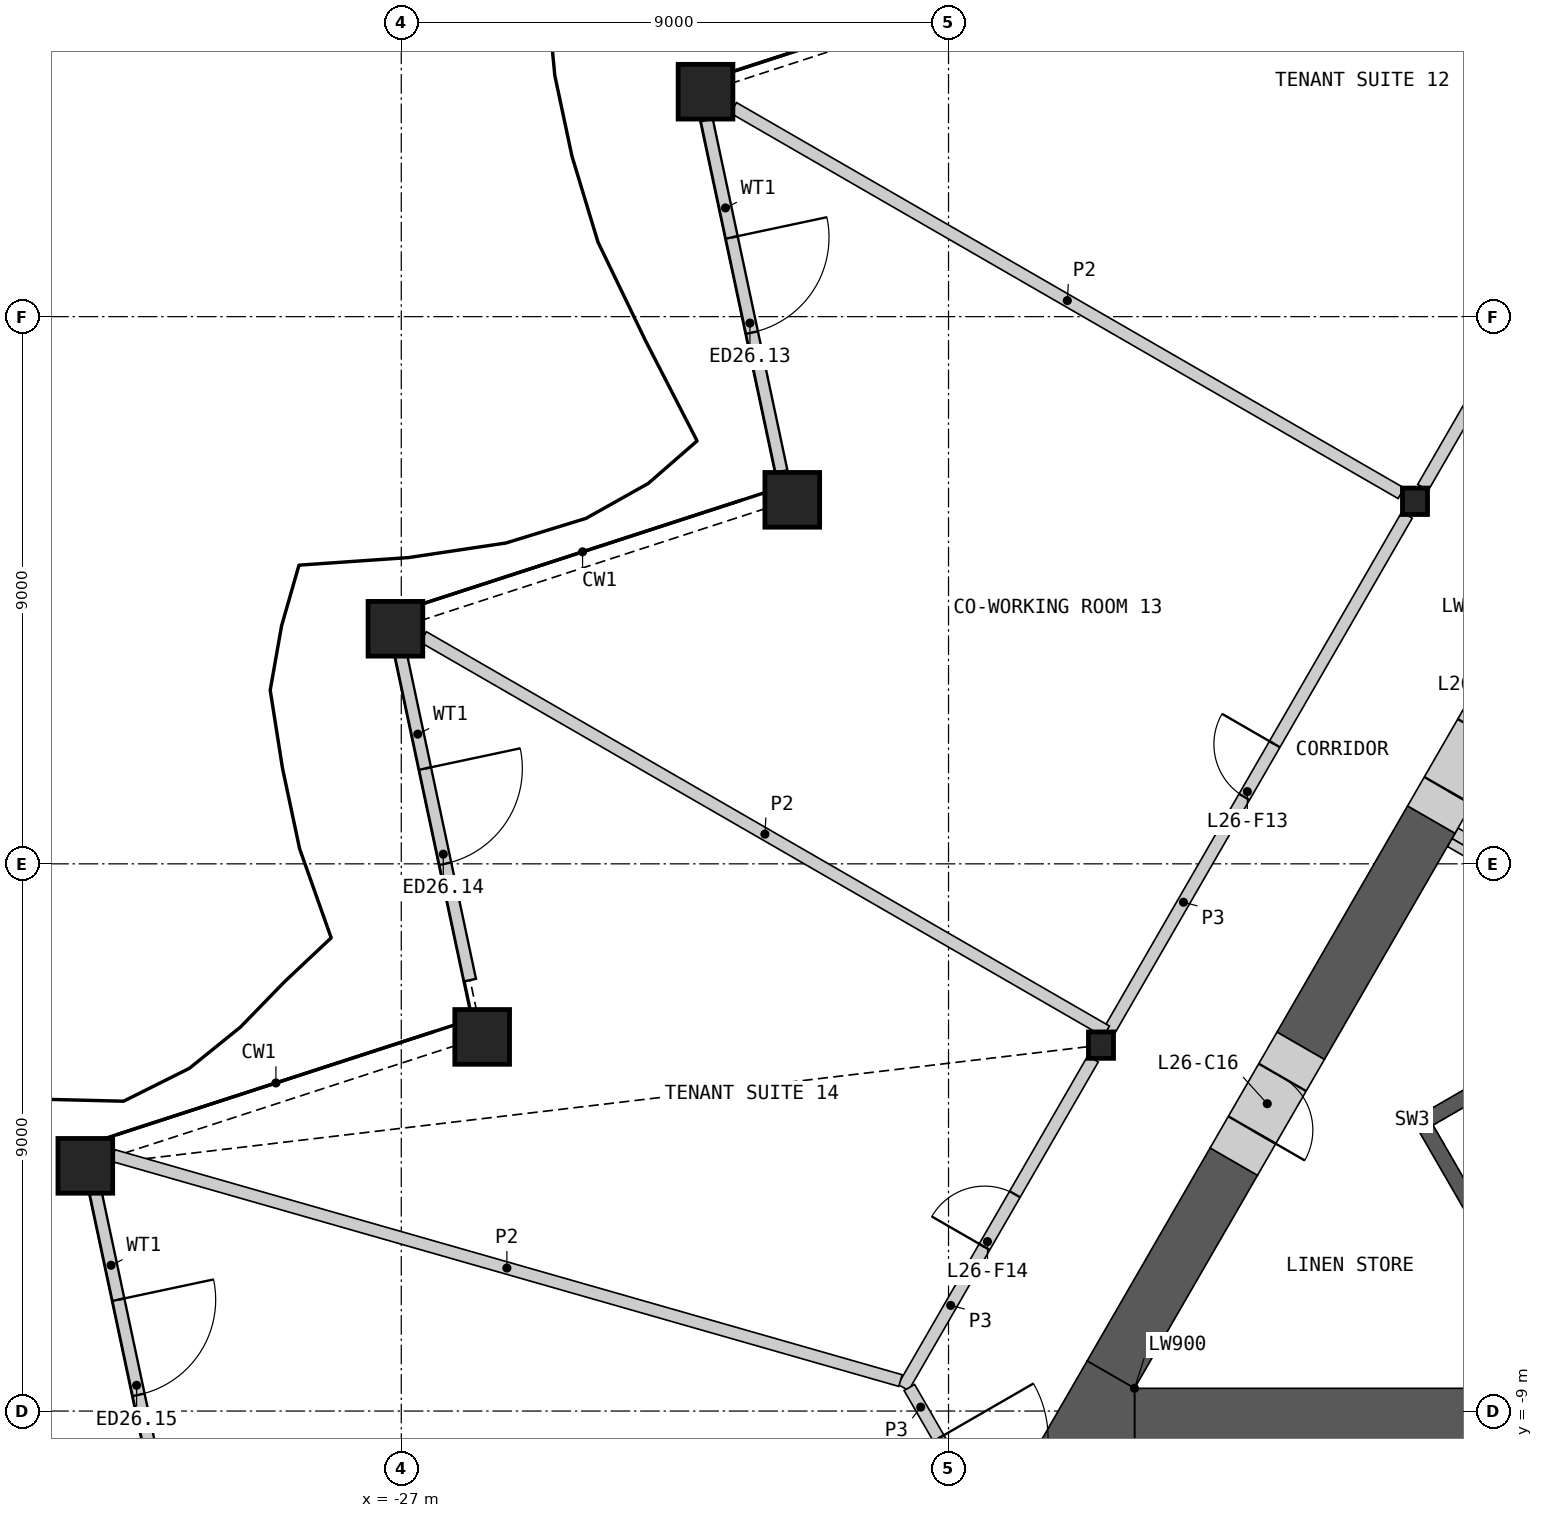
"""IFC4 building model, lengths in metres.
Left out: names, types, materials, properties, quantities, classifications, styles, units other than length and angle.
Written with IfcOpenShell. Run it as: python <this file> out.ifc"""

import sys

from ifc_helpers import new_model, si_unit, direction, frame, frame_2d, origin, origin_2d, place, context, subcontext, project, spatial, polyline, rectangle, hollow_rectangle, i_section, outline, extrude, element, fill, save


model = new_model("IFC4")
c1 = context("Model", 3, precision=1e-05, world=origin(), true_north=direction((0.0, 1.0)))
c2 = subcontext(c1, "Body", "Model", "MODEL_VIEW")
j1 = project(units=[si_unit("LENGTHUNIT", "METRE"), si_unit("PLANEANGLEUNIT", "RADIAN")], contexts=[c1])
p1 = place(None, origin())
s1 = spatial("IfcSite", under=j1, at=p1, CompositionType="ELEMENT")
p2 = place(p1, origin())
s2 = spatial("IfcBuilding", under=s1, at=p2, CompositionType="ELEMENT")
p3 = place(p2, frame((0.0, 0.0, 124.8)))
s3 = spatial("IfcBuildingStorey", under=s2, at=p3, CompositionType="ELEMENT", Elevation=124.8)
for number, where, z_axis, x_axis in (
    (1, (-21.996, 12.699, 0.0), (0.0, 0.0, 1.0), (1.0, 0.0, 0.0)),
    (2, (-20.57, 5.987, 0.0), (0.0, 0.0, 1.0), (1.0, 0.0, 0.0)),
    (3, (-27.096, 3.866, 0.0), (0.0, 0.0, 1.0), (1.0, 0.0, 0.0)),
    (4, (-25.669, -2.846, 0.0), (0.0, 0.0, 1.0), (1.0, 0.0, 0.0)),
    (5, (-32.196, -4.967, 0.0), (0.0, 0.0, 1.0), (1.0, 0.0, 0.0)),
):
    element("IfcColumn", number, at=place(p3, frame(where, z_axis=z_axis, x_axis=x_axis)), inside=s3, PredefinedType="COLUMN", context=c2, shape_type="SweptSolid", body=[
        extrude(hollow_rectangle(XDim=0.9, YDim=0.9, WallThickness=0.06, at=origin_2d()), origin(), (0.0, 0.0, 1.0), 4.2),
    ])
for number, where, z_axis, x_axis in (
    (6, (-10.328, 5.963, 0.0), (0.0, 0.0, 1.0), (1.0, 0.0, 0.0)),
    (7, (-15.493, -2.982, 0.0), (0.0, 0.0, 1.0), (1.0, 0.0, 0.0)),
):
    element("IfcColumn", number, at=place(p3, frame(where, z_axis=z_axis, x_axis=x_axis)), inside=s3, PredefinedType="COLUMN", context=c2, shape_type="SweptSolid", body=[
        extrude(i_section(OverallWidth=0.412, OverallDepth=0.435, WebThickness=0.036, FlangeThickness=0.057, at=origin_2d()), origin(), (0.0, 0.0, 1.0), 4.2),
    ])
p4 = place(p3, frame((-21.976, 12.233, 0.0), z_axis=(0.0, 0.0, 1.0), x_axis=(0.207925965623, -0.978144566421, 0.0)))
e8 = element("IfcWall", 8, at=p4, inside=s3, PredefinedType="SOLIDWALL", context=c2, shape_type="SweptSolid", body=[
    extrude(rectangle(XDim=5.908, YDim=0.2, at=frame_2d((2.954, 0.0))), origin(), (0.0, 0.0, 1.0), 3.189),
])
p5 = place(p4, frame((1.973, 0.0, 0.0)))
e9 = element("IfcOpeningElement", 9, at=p5, cuts=e8, PredefinedType="OPENING", context=c2, shape_type="SweptSolid", body=[
    extrude(rectangle(XDim=1.6, YDim=2.4, at=frame_2d((0.8, 1.2))), frame((0.0, 0.11, 0.0), z_axis=(0.0, -1.0, 0.0), x_axis=(1.0, 0.0, 0.0)), (0.0, 0.0, 1.0), 0.22),
])
p6 = place(p3, frame((-27.016, 3.482, 0.0), z_axis=(0.0, 0.0, 1.0), x_axis=(0.207902173992, -0.978149623549, 0.0)))
e10 = element("IfcWall", 10, at=p6, inside=s3, PredefinedType="SOLIDWALL", context=c2, shape_type="SweptSolid", body=[
    extrude(rectangle(XDim=5.515, YDim=0.2, at=frame_2d((2.757, 0.0))), origin(), (0.0, 0.0, 1.0), 3.189),
])
p7 = place(p6, frame((1.957, 0.0, 0.0)))
e11 = element("IfcOpeningElement", 11, at=p7, cuts=e10, PredefinedType="OPENING", context=c2, shape_type="SweptSolid", body=[
    extrude(rectangle(XDim=1.6, YDim=2.4, at=frame_2d((0.8, 1.2))), frame((0.0, 0.11, 0.0), z_axis=(0.0, -1.0, 0.0), x_axis=(1.0, 0.0, 0.0)), (0.0, 0.0, 1.0), 0.22),
])
p8 = place(p3, frame((-32.059, -5.254, 0.0), z_axis=(0.0, 0.0, 1.0), x_axis=(0.207902173992, -0.978149623549, 0.0)))
e12 = element("IfcWall", 12, at=p8, inside=s3, PredefinedType="SOLIDWALL", context=c2, shape_type="SweptSolid", body=[
    extrude(rectangle(XDim=5.515, YDim=0.2, at=frame_2d((2.757, 0.0))), origin(), (0.0, 0.0, 1.0), 3.189),
])
p9 = place(p8, frame((1.957, 0.0, 0.0)))
e13 = element("IfcOpeningElement", 13, at=p9, cuts=e12, PredefinedType="OPENING", context=c2, shape_type="SweptSolid", body=[
    extrude(rectangle(XDim=1.6, YDim=2.4, at=frame_2d((0.8, 1.2))), frame((0.0, 0.11, 0.0), z_axis=(0.0, -1.0, 0.0), x_axis=(1.0, 0.0, 0.0)), (0.0, 0.0, 1.0), 0.22),
])
p10 = place(p3, frame((-8.181, -0.357, 0.0), z_axis=(0.0, 0.0, 1.0), x_axis=(-0.866024871741, 0.500000921525, 0.0)))
e14 = element("IfcWall", 14, at=p10, inside=s3, PredefinedType="SHEAR", context=c2, shape_type="SweptSolid", body=[
    extrude(rectangle(XDim=1.72, YDim=0.2, at=frame_2d((0.86, 0.0))), origin(), (0.0, 0.0, 1.0), 3.8),
])
p11 = place(p3, origin())
e15 = element("IfcWall", 15, at=p11, inside=s3, PredefinedType="SHEAR", context=c2, shape_type="SweptSolid", body=[
    extrude(outline(polyline([(-5.307, -1.281), (-10.374, -4.206), (-10.032, -4.298), (-5.182, -1.498), (-5.307, -1.281)])), origin(), (0.0, 0.0, 1.0), 3.8),
])
p12 = place(p3, origin())
e16 = element("IfcWall", 16, at=p12, inside=s3, PredefinedType="SHEAR", context=c2, shape_type="SweptSolid", body=[
    extrude(outline(polyline([(-10.374, -4.206), (-8.83, -6.881), (-8.738, -6.539), (-10.032, -4.298), (-10.374, -4.206)])), origin(), (0.0, 0.0, 1.0), 3.8),
])
p13 = place(p3, frame((-8.268, -0.509, 0.0), z_axis=(0.0, 0.0, 1.0), x_axis=(-0.866024871741, 0.500000921525, 0.0)))
e17 = element("IfcWall", 17, at=p13, inside=s3, PredefinedType="PARTITIONING", context=c2, shape_type="SweptSolid", body=[
    extrude(rectangle(XDim=1.72, YDim=0.15, at=frame_2d((0.86, 0.0))), origin(), (0.0, 0.0, 1.0), 3.8),
])
p14 = place(p3, frame((-14.941, -9.076, 0.0), z_axis=(0.0, 0.0, 1.0), x_axis=(1.0, 0.0, 0.0)))
e18 = element("IfcWall", 18, at=p14, inside=s3, PredefinedType="SHEAR", context=c2, shape_type="SweptSolid", body=[
    extrude(rectangle(XDim=11.275, YDim=0.9, at=frame_2d((5.638, 0.0))), origin(), (0.0, 0.0, 1.0), 3.8),
])
p15 = place(p3, frame((-10.06, 0.728, 0.0), z_axis=(0.0, 0.0, 1.0), x_axis=(-0.499996331799, -0.866027521611, 0.0)))
e19 = element("IfcWall", 19, at=p15, inside=s3, PredefinedType="SHEAR", context=c2, shape_type="SweptSolid", body=[
    extrude(rectangle(XDim=4.295, YDim=0.9, at=frame_2d((2.148, 0.0))), origin(), (0.0, 0.0, 1.0), 3.8),
])
p16 = place(p3, frame((-13.308, -4.898, 0.0), z_axis=(0.0, 0.0, 1.0), x_axis=(-0.499974938593, -0.866039872511, 0.0)))
e20 = element("IfcWall", 20, at=p16, inside=s3, PredefinedType="SHEAR", context=c2, shape_type="SweptSolid", body=[
    extrude(rectangle(XDim=4.046, YDim=0.9, at=frame_2d((2.023, 0.0))), origin(), (0.0, 0.0, 1.0), 3.8),
])
p17 = place(p3, origin())
e21 = element("IfcWall", 21, at=p17, inside=s3, PredefinedType="SHEAR", context=c2, shape_type="SweptSolid", body=[
    extrude(outline(polyline([(-14.941, -8.626), (-14.941, -9.526), (-16.5, -9.526), (-15.721, -8.176), (-14.941, -8.626)])), origin(), (0.0, 0.0, 1.0), 3.8),
])
p18 = place(p3, frame((-12.208, -2.992, 0.0), z_axis=(0.0, 0.0, 1.0), x_axis=(-0.50002983664, -0.866008176907, 0.0)))
e22 = element("IfcWall", 22, at=p18, inside=s3, PredefinedType="SHEAR", context=c2, shape_type="SweptSolid", body=[
    extrude(rectangle(XDim=2.2, YDim=0.9, at=frame_2d((1.1, 0.0))), origin(), (0.0, 0.0, 1.0), 3.8),
])
p19 = place(p18, frame((0.6, 0.0, 0.0)))
e23 = element("IfcOpeningElement", 23, at=p19, cuts=e22, PredefinedType="OPENING", context=c2, shape_type="SweptSolid", body=[
    extrude(rectangle(XDim=1.0, YDim=2.1, at=frame_2d((0.5, 1.05))), frame((0.0, 0.46, 0.0), z_axis=(0.0, -1.0, 0.0), x_axis=(1.0, 0.0, 0.0)), (0.0, 0.0, 1.0), 0.92),
])
p20 = place(p3, frame((-8.96, 2.633, 0.0), z_axis=(0.0, 0.0, 1.0), x_axis=(-0.50002983664, -0.866008176907, 0.0)))
e24 = element("IfcWall", 24, at=p20, inside=s3, PredefinedType="SHEAR", context=c2, shape_type="SweptSolid", body=[
    extrude(rectangle(XDim=2.2, YDim=0.9, at=frame_2d((1.1, 0.0))), origin(), (0.0, 0.0, 1.0), 3.8),
])
p21 = place(p20, frame((0.55, 0.0, 0.0)))
e25 = element("IfcOpeningElement", 25, at=p21, cuts=e24, PredefinedType="OPENING", context=c2, shape_type="SweptSolid", body=[
    extrude(rectangle(XDim=1.1, YDim=2.1, at=frame_2d((0.55, 1.05))), frame((0.0, 0.46, 0.0), z_axis=(0.0, -1.0, 0.0), x_axis=(1.0, 0.0, 0.0)), (0.0, 0.0, 1.0), 0.92),
])
p22 = place(p3, frame((-15.361, -2.754, 0.0), z_axis=(0.0, 0.0, 1.0), x_axis=(0.500004141693, 0.866023012564, 0.0)))
e26 = element("IfcWall", 26, at=p22, inside=s3, PredefinedType="PARTITIONING", context=c2, shape_type="SweptSolid", body=[
    extrude(rectangle(XDim=9.803, YDim=0.2, at=frame_2d((4.902, 0.0))), origin(), (0.0, 0.0, 1.0), 3.8),
])
p23 = place(p22, frame((4.452, 0.0, 0.0)))
e27 = element("IfcOpeningElement", 27, at=p23, cuts=e26, PredefinedType="OPENING", context=c2, shape_type="SweptSolid", body=[
    extrude(rectangle(XDim=1.0, YDim=2.1, at=frame_2d((0.5, 1.05))), frame((0.0, 0.11, 0.0), z_axis=(0.0, -1.0, 0.0), x_axis=(1.0, 0.0, 0.0)), (0.0, 0.0, 1.0), 0.22),
])
p24 = place(p3, frame((-10.197, 6.19, 0.0), z_axis=(0.0, 0.0, 1.0), x_axis=(0.500012035596, 0.866018454918, 0.0)))
e28 = element("IfcWall", 28, at=p24, inside=s3, PredefinedType="PARTITIONING", context=c2, shape_type="SweptSolid", body=[
    extrude(rectangle(XDim=9.803, YDim=0.2, at=frame_2d((4.902, 0.0))), origin(), (0.0, 0.0, 1.0), 3.8),
])
p25 = place(p24, frame((4.452, 0.0, 0.0)))
e29 = element("IfcOpeningElement", 29, at=p25, cuts=e28, PredefinedType="OPENING", context=c2, shape_type="SweptSolid", body=[
    extrude(rectangle(XDim=1.0, YDim=2.1, at=frame_2d((0.5, 1.05))), frame((0.0, 0.11, 0.0), z_axis=(0.0, -1.0, 0.0), x_axis=(1.0, 0.0, 0.0)), (0.0, 0.0, 1.0), 0.22),
])
p26 = place(p3, frame((-18.744, -8.613, 0.0), z_axis=(0.0, 0.0, 1.0), x_axis=(0.499997920671, 0.866026604282, 0.0)))
e30 = element("IfcWall", 30, at=p26, inside=s3, PredefinedType="PARTITIONING", context=c2, shape_type="SweptSolid", body=[
    extrude(rectangle(XDim=6.24, YDim=0.2, at=frame_2d((3.12, 0.0))), origin(), (0.0, 0.0, 1.0), 3.8),
])
p27 = place(p26, frame((2.67, 0.0, 0.0)))
e31 = element("IfcOpeningElement", 31, at=p27, cuts=e30, PredefinedType="OPENING", context=c2, shape_type="SweptSolid", body=[
    extrude(rectangle(XDim=1.0, YDim=2.1, at=frame_2d((0.5, 1.05))), frame((0.0, 0.11, 0.0), z_axis=(0.0, -1.0, 0.0), x_axis=(1.0, 0.0, 0.0)), (0.0, 0.0, 1.0), 0.22),
])
p28 = place(p3, frame((-18.644, -8.613, 0.0), z_axis=(0.0, 0.0, 1.0), x_axis=(0.499958791762, -0.866049194065, 0.0)))
e32 = element("IfcWall", 32, at=p28, inside=s3, PredefinedType="PARTITIONING", context=c2, shape_type="SweptSolid", body=[
    extrude(rectangle(XDim=3.726, YDim=0.2, at=frame_2d((1.863, 0.0))), origin(), (0.0, 0.0, 1.0), 3.8),
])
p29 = place(p28, frame((0.963, 0.0, 0.0)))
e33 = element("IfcOpeningElement", 33, at=p29, cuts=e32, PredefinedType="OPENING", context=c2, shape_type="SweptSolid", body=[
    extrude(rectangle(XDim=1.8, YDim=2.1, at=frame_2d((0.9, 1.05))), frame((0.0, 0.11, 0.0), z_axis=(0.0, -1.0, 0.0), x_axis=(1.0, 0.0, 0.0)), (0.0, 0.0, 1.0), 0.22),
])
p30 = place(p3, frame((-31.736, -4.798, 0.0), z_axis=(0.0, 0.0, 1.0), x_axis=(0.961478776026, -0.274879179372, 0.0)))
e34 = element("IfcWall", 34, at=p30, inside=s3, PredefinedType="PARTITIONING", context=c2, shape_type="SweptSolid", body=[
    extrude(rectangle(XDim=13.465, YDim=0.2, at=frame_2d((6.732, 0.0))), origin(), (0.0, 0.0, 1.0), 2.885),
])
p31 = place(p3, frame((-26.636, 3.731, 0.0), z_axis=(0.0, 0.0, 1.0), x_axis=(0.866024473704, -0.500001610943, 0.0)))
e35 = element("IfcWall", 35, at=p31, inside=s3, PredefinedType="PARTITIONING", context=c2, shape_type="SweptSolid", body=[
    extrude(rectangle(XDim=12.971, YDim=0.2, at=frame_2d((6.485, 0.0))), origin(), (0.0, 0.0, 1.0), 2.885),
])
p32 = place(p3, frame((-21.536, 12.434, 0.0), z_axis=(0.0, 0.0, 1.0), x_axis=(0.86602461759, -0.500001361726, 0.0)))
e36 = element("IfcWall", 36, at=p32, inside=s3, PredefinedType="PARTITIONING", context=c2, shape_type="SweptSolid", body=[
    extrude(rectangle(XDim=12.679, YDim=0.2, at=frame_2d((6.34, 0.0))), origin(), (0.0, 0.0, 1.0), 2.885),
])
p33 = place(p5, origin())
e37 = element("IfcDoor", 37, at=p33, inside=s3, OperationType="DOUBLE_DOOR_SINGLE_SWING", PredefinedType="DOOR", context=c2, shape_type="SweptSolid", body=[
    extrude(rectangle(XDim=1.6, YDim=2.4, at=frame_2d((0.8, 1.2))), frame((0.0, 0.025, 0.0), z_axis=(0.0, -1.0, 0.0), x_axis=(1.0, 0.0, 0.0)), (0.0, 0.0, 1.0), 0.05),
])
fill(e9, e37)
p34 = place(p7, origin())
e38 = element("IfcDoor", 38, at=p34, inside=s3, OperationType="DOUBLE_DOOR_SINGLE_SWING", PredefinedType="DOOR", context=c2, shape_type="SweptSolid", body=[
    extrude(rectangle(XDim=1.6, YDim=2.4, at=frame_2d((0.8, 1.2))), frame((0.0, 0.025, 0.0), z_axis=(0.0, -1.0, 0.0), x_axis=(1.0, 0.0, 0.0)), (0.0, 0.0, 1.0), 0.05),
])
fill(e11, e38)
p35 = place(p9, origin())
e39 = element("IfcDoor", 39, at=p35, inside=s3, OperationType="DOUBLE_DOOR_SINGLE_SWING", PredefinedType="DOOR", context=c2, shape_type="SweptSolid", body=[
    extrude(rectangle(XDim=1.6, YDim=2.4, at=frame_2d((0.8, 1.2))), frame((0.0, 0.025, 0.0), z_axis=(0.0, -1.0, 0.0), x_axis=(1.0, 0.0, 0.0)), (0.0, 0.0, 1.0), 0.05),
])
fill(e13, e39)
p36 = place(p19, origin())
e40 = element("IfcDoor", 40, at=p36, inside=s3, OperationType="SINGLE_SWING_RIGHT", PredefinedType="DOOR", context=c2, shape_type="SweptSolid", body=[
    extrude(rectangle(XDim=1.0, YDim=2.1, at=frame_2d((0.5, 1.05))), frame((0.0, 0.205, 0.0), z_axis=(0.0, -1.0, 0.0), x_axis=(1.0, 0.0, 0.0)), (0.0, 0.0, 1.0), 0.05),
])
fill(e23, e40)
p37 = place(p21, origin())
e41 = element("IfcDoor", 41, at=p37, inside=s3, OperationType="SINGLE_SWING_RIGHT", PredefinedType="DOOR", context=c2, shape_type="SweptSolid", body=[
    extrude(rectangle(XDim=1.1, YDim=2.1, at=frame_2d((0.55, 1.05))), frame((0.0, 0.205, 0.0), z_axis=(0.0, -1.0, 0.0), x_axis=(1.0, 0.0, 0.0)), (0.0, 0.0, 1.0), 0.05),
])
fill(e25, e41)
p38 = place(p23, origin())
e42 = element("IfcDoor", 42, at=p38, inside=s3, OperationType="SINGLE_SWING_RIGHT", PredefinedType="DOOR", context=c2, shape_type="SweptSolid", body=[
    extrude(rectangle(XDim=1.0, YDim=2.1, at=frame_2d((0.5, 1.05))), frame((0.0, 0.025, 0.0), z_axis=(0.0, -1.0, 0.0), x_axis=(1.0, 0.0, 0.0)), (0.0, 0.0, 1.0), 0.05),
])
fill(e27, e42)
p39 = place(p27, origin())
e43 = element("IfcDoor", 43, at=p39, inside=s3, OperationType="SINGLE_SWING_LEFT", PredefinedType="DOOR", context=c2, shape_type="SweptSolid", body=[
    extrude(rectangle(XDim=1.0, YDim=2.1, at=frame_2d((0.5, 1.05))), frame((0.0, 0.025, 0.0), z_axis=(0.0, -1.0, 0.0), x_axis=(1.0, 0.0, 0.0)), (0.0, 0.0, 1.0), 0.05),
])
fill(e31, e43)
p40 = place(p29, origin())
e44 = element("IfcDoor", 44, at=p40, inside=s3, OperationType="DOUBLE_DOOR_SINGLE_SWING", PredefinedType="DOOR", context=c2, shape_type="SweptSolid", body=[
    extrude(rectangle(XDim=1.8, YDim=2.1, at=frame_2d((0.9, 1.05))), frame((0.0, 0.025, 0.0), z_axis=(0.0, -1.0, 0.0), x_axis=(1.0, 0.0, 0.0)), (0.0, 0.0, 1.0), 0.05),
])
fill(e33, e44)
save(model, sys.argv[1])
